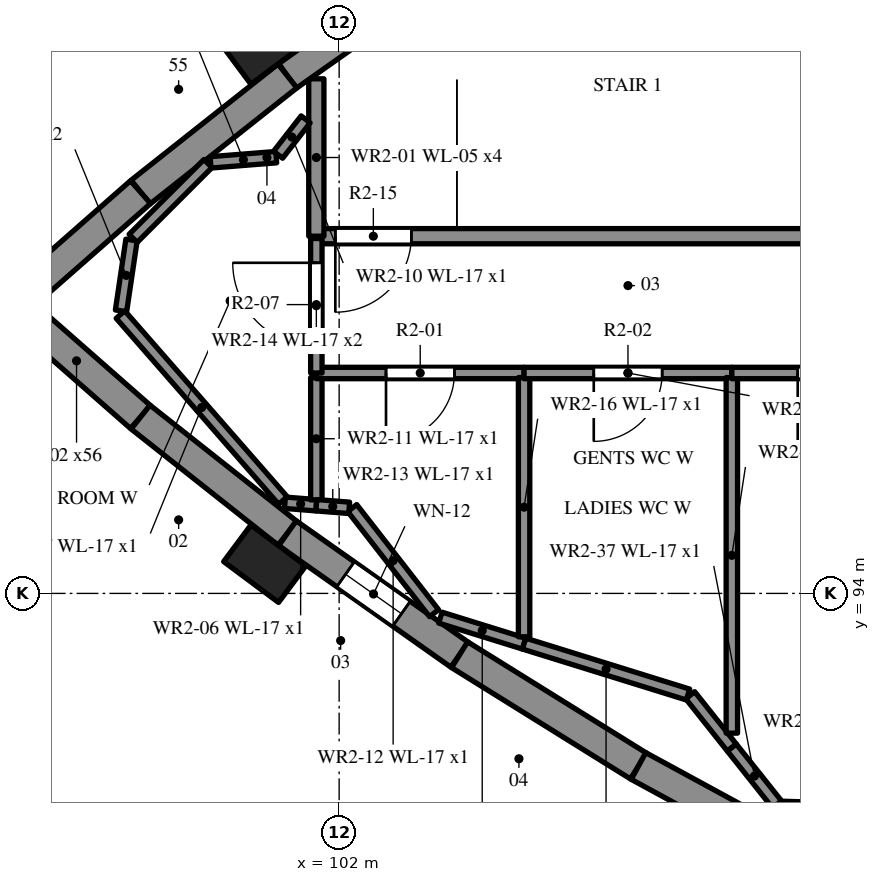
"""IFC4 building model, lengths in metres.
Left out: names, types, materials, properties, quantities, classifications, styles, units other than length and angle.
Written with IfcOpenShell. Run it as: python <this file> out.ifc"""

import sys

from ifc_helpers import new_model, si_unit, direction, frame, frame_2d, origin, origin_2d, place, context, subcontext, project, spatial, polyline, rectangle, outline, extrude, element, fill, save


model = new_model("IFC4")
c1 = context("Model", 3, precision=1e-05, world=origin(), true_north=direction((0.0, 1.0)))
c2 = subcontext(c1, "Body", "Model", "MODEL_VIEW")
j1 = project(units=[si_unit("LENGTHUNIT", "METRE"), si_unit("PLANEANGLEUNIT", "RADIAN")], contexts=[c1])
p1 = place(None, origin())
s1 = spatial("IfcSite", under=j1, at=p1, CompositionType="ELEMENT")
p2 = place(p1, origin())
s2 = spatial("IfcBuilding", under=s1, at=p2, CompositionType="ELEMENT")
p3 = place(p2, frame((0.0, 0.0, 10.2)))
s3 = spatial("IfcBuildingStorey", under=s2, at=p3, CompositionType="ELEMENT", Elevation=10.2)
p4 = place(p3, frame((109.9, 98.7, 0.0), z_axis=(0.0, 0.0, 1.0), x_axis=(-1.0, 0.0, 0.0)))
e1 = element("IfcWall", 1, at=p4, inside=s3, PredefinedType="SHEAR", context=c2, shape_type="SweptSolid", body=[
    extrude(outline(polyline([(0.0, 0.0), (8.2, 0.0), (8.2, 5.845), (8.187, 5.849), (8.088, 5.881), (7.972, 5.899), (7.896, 5.911), (7.819, 5.901), (0.0, 8.427), (0.0, 0.0)])), frame((0.0, 0.1, 0.0), z_axis=(0.0, -1.0, 0.0), x_axis=(1.0, 0.0, 0.0)), (0.0, 0.0, 1.0), 0.2),
])
p5 = place(p4, frame((6.95, 0.0, 0.0)))
e2 = element("IfcOpeningElement", 2, at=p5, cuts=e1, PredefinedType="OPENING", context=c2, shape_type="SweptSolid", body=[
    extrude(rectangle(XDim=1.0, YDim=2.4, at=frame_2d((0.5, 1.2))), frame((0.0, 0.11, 0.0), z_axis=(0.0, -1.0, 0.0), x_axis=(1.0, 0.0, 0.0)), (0.0, 0.0, 1.0), 0.22),
])
p6 = place(p3, frame((101.7, 98.7, 0.0), z_axis=(0.0, 0.0, 1.0), x_axis=(0.0, 1.0, 0.0)))
e3 = element("IfcWall", 3, at=p6, inside=s3, PredefinedType="SHEAR", context=c2, shape_type="SweptSolid", body=[
    extrude(outline(polyline([(0.0, 0.0), (2.071, 0.0), (2.071, 4.028), (0.077, 5.842), (0.0, 5.912), (0.0, 0.0)])), frame((0.0, 0.1, 0.0), z_axis=(0.0, -1.0, 0.0), x_axis=(1.0, 0.0, 0.0)), (0.0, 0.0, 1.0), 0.2),
])
p7 = place(p3, frame((97.703, 97.8, 0.0), z_axis=(0.0, 0.0, 1.0), x_axis=(0.751212351098, -0.660060605973, 0.0)))
e4 = element("IfcWall", 4, at=p7, inside=s3, PredefinedType="SOLIDWALL", context=c2, shape_type="SweptSolid", body=[
    extrude(outline(polyline([(0.0, 0.0), (2.242, 0.0), (2.242, 2.647), (2.202, 2.635), (0.372, 1.901), (0.145, 1.809), (0.083, 1.784), (0.0, 1.751), (0.0, 0.0)])), frame((0.0, 0.2, 0.0), z_axis=(0.0, -1.0, 0.0), x_axis=(1.0, 0.0, 0.0)), (0.0, 0.0, 1.0), 0.4),
])
p8 = place(p3, frame((99.387, 96.32, 0.0), z_axis=(0.0, 0.0, 1.0), x_axis=(0.784278812541, -0.620408530082, 0.0)))
e5 = element("IfcWall", 5, at=p8, inside=s3, PredefinedType="SOLIDWALL", context=c2, shape_type="SweptSolid", body=[
    extrude(outline(polyline([(0.0, 0.0), (2.464, 0.0), (2.464, 3.551), (2.446, 3.544), (2.288, 3.486), (2.129, 3.428), (0.051, 2.669), (0.0, 2.651), (0.0, 0.0)])), frame((0.0, 0.2, 0.0), z_axis=(0.0, -1.0, 0.0), x_axis=(1.0, 0.0, 0.0)), (0.0, 0.0, 1.0), 0.4),
])
p9 = place(p3, frame((101.32, 94.792, 0.0), z_axis=(0.0, 0.0, 1.0), x_axis=(0.817028877428, -0.576596751161, 0.0)))
e6 = element("IfcWall", 6, at=p9, inside=s3, PredefinedType="SOLIDWALL", context=c2, shape_type="SweptSolid", body=[
    extrude(outline(polyline([(0.0, 0.0), (2.772, 0.0), (2.772, 2.848), (2.406, 2.968), (0.311, 3.647), (0.169, 3.693), (0.0, 3.555), (0.0, 0.0)])), frame((0.0, 0.2, 0.0), z_axis=(0.0, -1.0, 0.0), x_axis=(1.0, 0.0, 0.0)), (0.0, 0.0, 1.0), 0.4),
])
p10 = place(p9, frame((0.936, 0.0, 1.6)))
e7 = element("IfcOpeningElement", 7, at=p10, cuts=e6, PredefinedType="OPENING", context=c2, shape_type="SweptSolid", body=[
    extrude(rectangle(XDim=0.9, YDim=0.6, at=frame_2d((0.45, 0.3))), frame((0.0, 0.21, 0.0), z_axis=(0.0, -1.0, 0.0), x_axis=(1.0, 0.0, 0.0)), (0.0, 0.0, 1.0), 0.42),
])
p11 = place(p3, frame((103.585, 93.193, 0.0), z_axis=(0.0, 0.0, 1.0), x_axis=(0.84912946359, -0.528184772653, 0.0)))
e8 = element("IfcWall", 8, at=p11, inside=s3, PredefinedType="SOLIDWALL", context=c2, shape_type="SweptSolid", body=[
    extrude(outline(polyline([(0.0, 0.0), (2.772, 0.0), (2.772, 1.97), (2.247, 2.14), (0.321, 2.757), (0.0, 2.845), (0.0, 0.0)])), frame((0.0, 0.2, 0.0), z_axis=(0.0, -1.0, 0.0), x_axis=(1.0, 0.0, 0.0)), (0.0, 0.0, 1.0), 0.4),
])
p12 = place(p3, frame((105.938, 91.729, 0.0), z_axis=(0.0, 0.0, 1.0), x_axis=(0.878292493566, -0.478123724308, 0.0)))
e9 = element("IfcWall", 9, at=p12, inside=s3, PredefinedType="SOLIDWALL", context=c2, shape_type="SweptSolid", body=[
    extrude(outline(polyline([(0.0, 0.0), (2.772, 0.0), (2.772, 2.833), (2.737, 2.822), (0.0, 1.966), (0.0, 0.0)])), frame((0.0, 0.2, 0.0), z_axis=(0.0, -1.0, 0.0), x_axis=(1.0, 0.0, 0.0)), (0.0, 0.0, 1.0), 0.4),
])
p13 = place(p3, frame((103.585, 102.407, 0.0), z_axis=(0.0, 0.0, 1.0), x_axis=(-0.817070367038, -0.57653795652, 0.0)))
e10 = element("IfcWall", 10, at=p13, inside=s3, PredefinedType="SOLIDWALL", context=c2, shape_type="SweptSolid", body=[
    extrude(outline(polyline([(0.0, 0.0), (2.772, 0.0), (2.772, 3.555), (2.744, 3.568), (2.603, 3.693), (2.462, 3.647), (0.367, 2.968), (0.0, 2.848), (0.0, 0.0)])), frame((0.0, 0.2, 0.0), z_axis=(0.0, -1.0, 0.0), x_axis=(1.0, 0.0, 0.0)), (0.0, 0.0, 1.0), 0.4),
])
p14 = place(p3, frame((101.32, 100.809, 0.0), z_axis=(0.0, 0.0, 1.0), x_axis=(-0.784278812541, -0.620408530082, 0.0)))
e11 = element("IfcWall", 11, at=p14, inside=s3, PredefinedType="SOLIDWALL", context=c2, shape_type="SweptSolid", body=[
    extrude(outline(polyline([(0.0, 0.0), (2.464, 0.0), (2.464, 2.651), (2.414, 2.669), (0.335, 3.428), (0.177, 3.486), (0.0, 3.551), (0.0, 0.0)])), frame((0.0, 0.2, 0.0), z_axis=(0.0, -1.0, 0.0), x_axis=(1.0, 0.0, 0.0)), (0.0, 0.0, 1.0), 0.4),
])
p15 = place(p3, frame((99.387, 99.28, 0.0), z_axis=(0.0, 0.0, 1.0), x_axis=(-0.751212351098, -0.660060605973, 0.0)))
e12 = element("IfcWall", 12, at=p15, inside=s3, PredefinedType="SOLIDWALL", context=c2, shape_type="SweptSolid", body=[
    extrude(outline(polyline([(0.0, 0.0), (2.242, 0.0), (2.242, 1.751), (2.159, 1.784), (2.097, 1.809), (1.869, 1.901), (0.0, 2.647), (0.0, 0.0)])), frame((0.0, 0.2, 0.0), z_axis=(0.0, -1.0, 0.0), x_axis=(1.0, 0.0, 0.0)), (0.0, 0.0, 1.0), 0.4),
])
for number, where, z_axis, x_axis in (
    (13, (101.021, 94.391, 0.0), (0.0, 0.0, 1.0), (0.802, -0.597, 0.0)),
    (14, (101.021, 101.209, 0.0), (0.0, 0.0, 1.0), (-0.802, -0.597, 0.0)),
):
    element("IfcColumn", number, at=place(p3, frame(where, z_axis=z_axis, x_axis=x_axis)), inside=s3, PredefinedType="PILASTER", context=c2, shape_type="SweptSolid", body=[
        extrude(rectangle(XDim=0.9, YDim=0.6, at=origin_2d()), origin(), (0.0, 0.0, 1.0), 2.507),
    ])
p16 = place(p3, frame((101.7, 95.16, 0.0), z_axis=(0.0, 0.0, 1.0), x_axis=(-0.996882323864, 0.078902676549, 0.0)))
e15 = element("IfcWall", 15, at=p16, inside=s3, PredefinedType="PARTITIONING", context=c2, shape_type="SweptSolid", body=[
    extrude(rectangle(XDim=0.415, YDim=0.15, at=frame_2d((0.207, 0.0))), origin(), (0.0, 0.0, 1.0), 2.5),
])
p17 = place(p3, frame((101.26, 95.223, 0.0), z_axis=(0.0, 0.0, 1.0), x_axis=(-0.658009618923, 0.753009522785, 0.0)))
e16 = element("IfcWall", 16, at=p17, inside=s3, PredefinedType="PARTITIONING", context=c2, shape_type="SweptSolid", body=[
    extrude(rectangle(XDim=3.248, YDim=0.15, at=frame_2d((1.624, 0.0))), origin(), (0.0, 0.0, 1.0), 2.5),
])
p18 = place(p3, frame((99.13, 97.719, 0.0), z_axis=(0.0, 0.0, 1.0), x_axis=(0.146464106826, 0.989215985218, 0.0)))
e17 = element("IfcWall", 17, at=p18, inside=s3, PredefinedType="PARTITIONING", context=c2, shape_type="SweptSolid", body=[
    extrude(rectangle(XDim=0.942, YDim=0.15, at=frame_2d((0.471, 0.0))), origin(), (0.0, 0.0, 1.0), 2.5),
])
p19 = place(p3, frame((99.29, 98.671, 0.0), z_axis=(0.0, 0.0, 1.0), x_axis=(0.707106781187, 0.707106781187, 0.0)))
e18 = element("IfcWall", 18, at=p19, inside=s3, PredefinedType="PARTITIONING", context=c2, shape_type="SweptSolid", body=[
    extrude(rectangle(XDim=1.392, YDim=0.15, at=frame_2d((0.696, 0.0))), origin(), (0.0, 0.0, 1.0), 2.5),
])
p20 = place(p3, frame((100.308, 99.671, 0.0), z_axis=(0.0, 0.0, 1.0), x_axis=(0.996862570919, 0.07915184584, 0.0)))
e19 = element("IfcWall", 19, at=p20, inside=s3, PredefinedType="PARTITIONING", context=c2, shape_type="SweptSolid", body=[
    extrude(rectangle(XDim=0.867, YDim=0.15, at=frame_2d((0.433, 0.0))), origin(), (0.0, 0.0, 1.0), 2.5),
])
p21 = place(p3, frame((101.197, 99.771, 0.0), z_axis=(0.0, 0.0, 1.0), x_axis=(0.61419828637, 0.78915173764, 0.0)))
e20 = element("IfcWall", 20, at=p21, inside=s3, PredefinedType="PARTITIONING", context=c2, shape_type="SweptSolid", body=[
    extrude(rectangle(XDim=0.59, YDim=0.15, at=frame_2d((0.295, 0.0))), origin(), (0.0, 0.0, 1.0), 2.5),
])
p22 = place(p3, frame((101.7, 95.23, 0.0), z_axis=(0.0, 0.0, 1.0), x_axis=(0.0, 1.0, 0.0)))
e21 = element("IfcWall", 21, at=p22, inside=s3, PredefinedType="PARTITIONING", context=c2, shape_type="SweptSolid", body=[
    extrude(rectangle(XDim=1.61, YDim=0.15, at=frame_2d((0.805, 0.0))), origin(), (0.0, 0.0, 1.0), 2.5),
])
p23 = place(p3, frame((103.249, 93.74, 0.0), z_axis=(0.0, 0.0, 1.0), x_axis=(-0.614278072816, 0.789089633221, 0.0)))
e22 = element("IfcWall", 22, at=p23, inside=s3, PredefinedType="PARTITIONING", context=c2, shape_type="SweptSolid", body=[
    extrude(rectangle(XDim=1.753, YDim=0.15, at=frame_2d((0.876, 0.0))), origin(), (0.0, 0.0, 1.0), 2.5),
])
p24 = place(p3, frame((102.132, 95.126, 0.0), z_axis=(0.0, 0.0, 1.0), x_axis=(-0.996890007863, 0.078805534218, 0.0)))
e23 = element("IfcWall", 23, at=p24, inside=s3, PredefinedType="PARTITIONING", context=c2, shape_type="SweptSolid", body=[
    extrude(rectangle(XDim=0.434, YDim=0.15, at=frame_2d((0.217, 0.0))), origin(), (0.0, 0.0, 1.0), 2.5),
])
p25 = place(p3, frame((104.433, 96.9, 0.0), z_axis=(0.0, 0.0, 1.0), x_axis=(-1.0, 0.0, 0.0)))
e24 = element("IfcWall", 24, at=p25, inside=s3, PredefinedType="PARTITIONING", context=c2, shape_type="SweptSolid", body=[
    extrude(rectangle(XDim=2.733, YDim=0.15, at=frame_2d((1.367, 0.0))), origin(), (0.0, 0.0, 1.0), 2.5),
])
p26 = place(p25, frame((0.917, 0.0, 0.0)))
e25 = element("IfcOpeningElement", 25, at=p26, cuts=e24, PredefinedType="OPENING", context=c2, shape_type="SweptSolid", body=[
    extrude(rectangle(XDim=0.9, YDim=2.1, at=frame_2d((0.45, 1.05))), frame((0.0, 0.085, 0.0), z_axis=(0.0, -1.0, 0.0), x_axis=(1.0, 0.0, 0.0)), (0.0, 0.0, 1.0), 0.17),
])
p27 = place(p3, frame((101.7, 96.9, 0.0), z_axis=(0.0, 0.0, 1.0), x_axis=(0.0, 1.0, 0.0)))
e26 = element("IfcWall", 26, at=p27, inside=s3, PredefinedType="PARTITIONING", context=c2, shape_type="SweptSolid", body=[
    extrude(rectangle(XDim=1.77, YDim=0.15, at=frame_2d((0.885, 0.0))), origin(), (0.0, 0.0, 1.0), 2.5),
])
p28 = place(p27, frame((0.35, 0.0, 0.0)))
e27 = element("IfcOpeningElement", 27, at=p28, cuts=e26, PredefinedType="OPENING", context=c2, shape_type="SweptSolid", body=[
    extrude(rectangle(XDim=1.1, YDim=2.1, at=frame_2d((0.55, 1.05))), frame((0.0, 0.085, 0.0), z_axis=(0.0, -1.0, 0.0), x_axis=(1.0, 0.0, 0.0)), (0.0, 0.0, 1.0), 0.17),
])
p29 = place(p3, frame((104.433, 93.339, 0.0), z_axis=(0.0, 0.0, 1.0), x_axis=(-0.955020738083, 0.296539019072, 0.0)))
e28 = element("IfcWall", 28, at=p29, inside=s3, PredefinedType="PARTITIONING", context=c2, shape_type="SweptSolid", body=[
    extrude(rectangle(XDim=1.154, YDim=0.15, at=frame_2d((0.577, 0.0))), origin(), (0.0, 0.0, 1.0), 2.5),
])
p30 = place(p3, frame((104.433, 96.84, 0.0), z_axis=(0.0, 0.0, 1.0), x_axis=(0.0, -1.0, 0.0)))
e29 = element("IfcWall", 29, at=p30, inside=s3, PredefinedType="PARTITIONING", context=c2, shape_type="SweptSolid", body=[
    extrude(rectangle(XDim=3.411, YDim=0.15, at=frame_2d((1.705, 0.0))), origin(), (0.0, 0.0, 1.0), 2.5),
])
p31 = place(p3, frame((107.167, 91.971, 0.0), z_axis=(0.0, 0.0, 1.0), x_axis=(-0.622427080418, 0.782677794218, 0.0)))
e30 = element("IfcWall", 30, at=p31, inside=s3, PredefinedType="PARTITIONING", context=c2, shape_type="SweptSolid", body=[
    extrude(rectangle(XDim=0.881, YDim=0.15, at=frame_2d((0.44, 0.0))), origin(), (0.0, 0.0, 1.0), 2.5),
])
p32 = place(p3, frame((106.59, 92.669, 0.0), z_axis=(0.0, 0.0, 1.0), x_axis=(-0.954990240033, 0.296637221944, 0.0)))
e31 = element("IfcWall", 31, at=p32, inside=s3, PredefinedType="PARTITIONING", context=c2, shape_type="SweptSolid", body=[
    extrude(rectangle(XDim=2.258, YDim=0.15, at=frame_2d((1.129, 0.0))), origin(), (0.0, 0.0, 1.0), 2.5),
])
p33 = place(p3, frame((107.167, 96.9, 0.0), z_axis=(0.0, 0.0, 1.0), x_axis=(-1.0, 0.0, 0.0)))
e32 = element("IfcWall", 32, at=p33, inside=s3, PredefinedType="PARTITIONING", context=c2, shape_type="SweptSolid", body=[
    extrude(rectangle(XDim=2.733, YDim=0.15, at=frame_2d((1.367, 0.0))), origin(), (0.0, 0.0, 1.0), 2.5),
])
p34 = place(p33, frame((0.917, 0.0, 0.0)))
e33 = element("IfcOpeningElement", 33, at=p34, cuts=e32, PredefinedType="OPENING", context=c2, shape_type="SweptSolid", body=[
    extrude(rectangle(XDim=0.9, YDim=2.1, at=frame_2d((0.45, 1.05))), frame((0.0, 0.085, 0.0), z_axis=(0.0, -1.0, 0.0), x_axis=(1.0, 0.0, 0.0)), (0.0, 0.0, 1.0), 0.17),
])
p35 = place(p3, frame((107.167, 96.84, 0.0), z_axis=(0.0, 0.0, 1.0), x_axis=(0.0, -1.0, 0.0)))
e34 = element("IfcWall", 34, at=p35, inside=s3, PredefinedType="PARTITIONING", context=c2, shape_type="SweptSolid", body=[
    extrude(rectangle(XDim=4.679, YDim=0.15, at=frame_2d((2.339, 0.0))), origin(), (0.0, 0.0, 1.0), 2.5),
])
p36 = place(p3, frame((108.538, 91.17, 0.0), z_axis=(0.0, 0.0, 1.0), x_axis=(-0.999591291149, 0.028587596237, 0.0)))
e35 = element("IfcWall", 35, at=p36, inside=s3, PredefinedType="PARTITIONING", context=c2, shape_type="SweptSolid", body=[
    extrude(rectangle(XDim=0.751, YDim=0.15, at=frame_2d((0.376, 0.0))), origin(), (0.0, 0.0, 1.0), 2.5),
])
p37 = place(p3, frame((107.761, 91.223, 0.0), z_axis=(0.0, 0.0, 1.0), x_axis=(-0.622199976872, 0.782858345284, 0.0)))
e36 = element("IfcWall", 36, at=p37, inside=s3, PredefinedType="PARTITIONING", context=c2, shape_type="SweptSolid", body=[
    extrude(rectangle(XDim=0.956, YDim=0.15, at=frame_2d((0.478, 0.0))), origin(), (0.0, 0.0, 1.0), 2.5),
])
p38 = place(p3, frame((109.9, 96.9, 0.0), z_axis=(0.0, 0.0, 1.0), x_axis=(-1.0, 0.0, 0.0)))
e37 = element("IfcWall", 37, at=p38, inside=s3, PredefinedType="PARTITIONING", context=c2, shape_type="SweptSolid", body=[
    extrude(rectangle(XDim=2.733, YDim=0.15, at=frame_2d((1.367, 0.0))), origin(), (0.0, 0.0, 1.0), 2.5),
])
p39 = place(p38, frame((0.867, 0.0, 0.0)))
e38 = element("IfcOpeningElement", 38, at=p39, cuts=e37, PredefinedType="OPENING", context=c2, shape_type="SweptSolid", body=[
    extrude(rectangle(XDim=1.0, YDim=2.1, at=frame_2d((0.5, 1.05))), frame((0.0, 0.085, 0.0), z_axis=(0.0, -1.0, 0.0), x_axis=(1.0, 0.0, 0.0)), (0.0, 0.0, 1.0), 0.17),
])
p40 = place(p10, origin())
e39 = element("IfcWindow", 39, at=p40, inside=s3, PartitioningType="SINGLE_PANEL", PredefinedType="WINDOW", context=c2, shape_type="SweptSolid", body=[
    extrude(rectangle(XDim=0.9, YDim=0.6, at=frame_2d((0.45, 0.3))), frame((0.0, 0.03, 0.0), z_axis=(0.0, -1.0, 0.0), x_axis=(1.0, 0.0, 0.0)), (0.0, 0.0, 1.0), 0.06),
])
fill(e7, e39)
p41 = place(p26, origin())
e40 = element("IfcDoor", 40, at=p41, inside=s3, OperationType="SINGLE_SWING_RIGHT", PredefinedType="DOOR", context=c2, shape_type="SweptSolid", body=[
    extrude(rectangle(XDim=0.9, YDim=2.1, at=frame_2d((0.45, 1.05))), frame((0.0, 0.025, 0.0), z_axis=(0.0, -1.0, 0.0), x_axis=(1.0, 0.0, 0.0)), (0.0, 0.0, 1.0), 0.05),
])
fill(e25, e40)
p42 = place(p34, origin())
e41 = element("IfcDoor", 41, at=p42, inside=s3, OperationType="SINGLE_SWING_RIGHT", PredefinedType="DOOR", context=c2, shape_type="SweptSolid", body=[
    extrude(rectangle(XDim=0.9, YDim=2.1, at=frame_2d((0.45, 1.05))), frame((0.0, 0.025, 0.0), z_axis=(0.0, -1.0, 0.0), x_axis=(1.0, 0.0, 0.0)), (0.0, 0.0, 1.0), 0.05),
])
fill(e33, e41)
p43 = place(p39, origin())
e42 = element("IfcDoor", 42, at=p43, inside=s3, OperationType="SINGLE_SWING_RIGHT", PredefinedType="DOOR", context=c2, shape_type="SweptSolid", body=[
    extrude(rectangle(XDim=1.0, YDim=2.1, at=frame_2d((0.5, 1.05))), frame((0.0, 0.025, 0.0), z_axis=(0.0, -1.0, 0.0), x_axis=(1.0, 0.0, 0.0)), (0.0, 0.0, 1.0), 0.05),
])
fill(e38, e42)
p44 = place(p28, origin())
e43 = element("IfcDoor", 43, at=p44, inside=s3, OperationType="SINGLE_SWING_RIGHT", PredefinedType="DOOR", context=c2, shape_type="SweptSolid", body=[
    extrude(rectangle(XDim=1.1, YDim=2.1, at=frame_2d((0.55, 1.05))), frame((0.0, 0.025, 0.0), z_axis=(0.0, -1.0, 0.0), x_axis=(1.0, 0.0, 0.0)), (0.0, 0.0, 1.0), 0.05),
])
fill(e27, e43)
p45 = place(p5, origin())
e44 = element("IfcDoor", 44, at=p45, inside=s3, OperationType="SINGLE_SWING_RIGHT", PredefinedType="DOOR", context=c2, shape_type="SweptSolid", body=[
    extrude(rectangle(XDim=1.0, YDim=2.4, at=frame_2d((0.5, 1.2))), frame((0.0, 0.025, 0.0), z_axis=(0.0, -1.0, 0.0), x_axis=(1.0, 0.0, 0.0)), (0.0, 0.0, 1.0), 0.05),
])
fill(e2, e44)
save(model, sys.argv[1])
